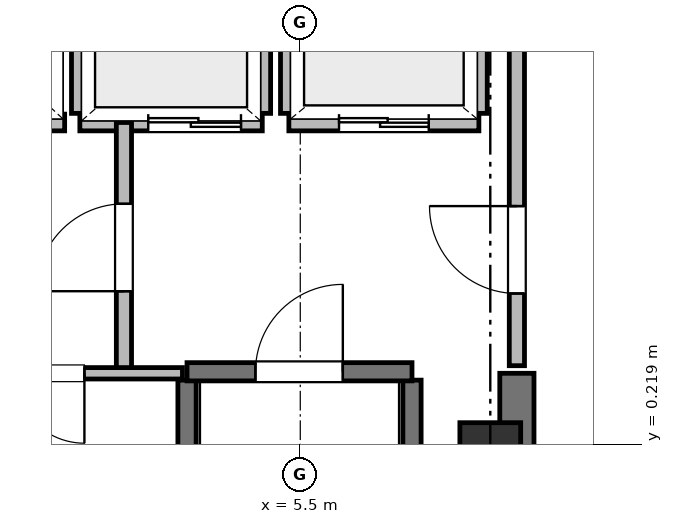
"""IFC4 building model, lengths in metres.
Left out: names, types, materials, properties, quantities, classifications, styles, units other than length and angle.
Written with IfcOpenShell. Run it as: python <this file> out.ifc"""

import sys

from ifc_helpers import new_model, si_unit, direction, frame, frame_2d, origin, origin_2d, place, context, subcontext, project, spatial, rectangle, extrude, element, fill, save


model = new_model("IFC4")
c1 = context("Model", 3, precision=1e-05, world=origin(), true_north=direction((0.0, 1.0)))
c2 = subcontext(c1, "Body", "Model", "MODEL_VIEW")
j1 = project(units=[si_unit("LENGTHUNIT", "METRE"), si_unit("PLANEANGLEUNIT", "RADIAN")], contexts=[c1])
p1 = place(None, origin())
s1 = spatial("IfcSite", under=j1, at=p1, CompositionType="ELEMENT")
p2 = place(p1, origin())
s2 = spatial("IfcBuilding", under=s1, at=p2, CompositionType="ELEMENT")
p3 = place(p2, frame((0.0, 0.0, 281.6)))
s3 = spatial("IfcBuildingStorey", under=s2, at=p3, CompositionType="ELEMENT", Elevation=281.6)
p4 = place(p3, frame((8.0, 0.0, 0.0), z_axis=(0.0, 0.0, 1.0), x_axis=(1.0, 0.0, 0.0)))
e1 = element("IfcColumn", 1, at=p4, inside=s3, PredefinedType="COLUMN", context=c2, shape_type="SweptSolid", body=[
    extrude(rectangle(XDim=0.8, YDim=1.0, at=origin_2d()), origin(), (0.0, 0.0, 1.0), 4.4),
])
p5 = place(p3, frame((8.35, -6.95, 0.0), z_axis=(0.0, 0.0, 1.0), x_axis=(0.0, 1.0, 0.0)))
e2 = element("IfcWall", 2, at=p5, inside=s3, PredefinedType="SHEAR", context=c2, shape_type="SweptSolid", body=[
    extrude(rectangle(XDim=8.1, YDim=0.45, at=frame_2d((4.05, 0.0))), origin(), (0.0, 0.0, 1.0), 4.13),
])
for number, where, z_axis, x_axis in (
    (3, (4.01, -6.16, 0.0), (0.0, 0.0, 1.0), (0.0, 1.0, 0.0)),
    (4, (6.97, -6.16, 0.0), (0.0, 0.0, 1.0), (0.0, 1.0, 0.0)),
):
    element("IfcWall", number, at=place(p3, frame(where, z_axis=z_axis, x_axis=x_axis)), inside=s3, PredefinedType="SHEAR", context=c2, shape_type="SweptSolid", body=[
        extrude(rectangle(XDim=7.22, YDim=0.24, at=frame_2d((3.61, 0.0))), origin(), (0.0, 0.0, 1.0), 4.13),
    ])
p6 = place(p3, frame((4.01, 1.17, 0.0), z_axis=(0.0, 0.0, 1.0), x_axis=(1.0, 0.0, 0.0)))
e5 = element("IfcWall", 5, at=p6, inside=s3, PredefinedType="SHEAR", context=c2, shape_type="SweptSolid", body=[
    extrude(rectangle(XDim=2.96, YDim=0.24, at=frame_2d((1.48, 0.0))), origin(), (0.0, 0.0, 1.0), 4.13),
])
p7 = place(p6, frame((0.9, 0.0, 0.0)))
e6 = element("IfcOpeningElement", 6, at=p7, cuts=e5, PredefinedType="OPENING", context=c2, shape_type="SweptSolid", body=[
    extrude(rectangle(XDim=1.15, YDim=2.15, at=frame_2d((0.575, 1.075))), frame((0.0, 0.13, 0.0), z_axis=(0.0, -1.0, 0.0), x_axis=(1.0, 0.0, 0.0)), (0.0, 0.0, 1.0), 0.26),
])
p8 = place(p3, frame((5.35, 4.45, 0.0), z_axis=(0.0, 0.0, 1.0), x_axis=(1.0, 0.0, 0.0)))
e7 = element("IfcWall", 7, at=p8, inside=s3, PredefinedType="PARTITIONING", context=c2, shape_type="SweptSolid", body=[
    extrude(rectangle(XDim=2.5, YDim=0.22, at=frame_2d((1.25, 0.0))), origin(), (0.0, 0.0, 1.0), 4.13),
])
p9 = place(p8, frame((0.66, 0.0, 0.0)))
e8 = element("IfcOpeningElement", 8, at=p9, cuts=e7, PredefinedType="OPENING", context=c2, shape_type="SweptSolid", body=[
    extrude(rectangle(XDim=1.18, YDim=2.15, at=frame_2d((0.59, 1.075))), frame((0.0, 0.12, 0.0), z_axis=(0.0, -1.0, 0.0), x_axis=(1.0, 0.0, 0.0)), (0.0, 0.0, 1.0), 0.24),
])
p10 = place(p3, frame((5.35, 4.57, 0.0), z_axis=(0.0, 0.0, 1.0), x_axis=(0.0, 1.0, 0.0)))
e9 = element("IfcWall", 9, at=p10, inside=s3, PredefinedType="PARTITIONING", context=c2, shape_type="SweptSolid", body=[
    extrude(rectangle(XDim=2.155, YDim=0.22, at=frame_2d((1.078, 0.0))), origin(), (0.0, 0.0, 1.0), 4.13),
])
p11 = place(p3, frame((7.85, 4.57, 0.0), z_axis=(0.0, 0.0, 1.0), x_axis=(0.0, 1.0, 0.0)))
e10 = element("IfcWall", 10, at=p11, inside=s3, PredefinedType="PARTITIONING", context=c2, shape_type="SweptSolid", body=[
    extrude(rectangle(XDim=2.155, YDim=0.22, at=frame_2d((1.078, 0.0))), origin(), (0.0, 0.0, 1.0), 3.81),
])
p12 = place(p3, frame((2.6, 4.45, 0.0), z_axis=(0.0, 0.0, 1.0), x_axis=(1.0, 0.0, 0.0)))
e11 = element("IfcWall", 11, at=p12, inside=s3, PredefinedType="PARTITIONING", context=c2, shape_type="SweptSolid", body=[
    extrude(rectangle(XDim=2.4, YDim=0.22, at=frame_2d((1.2, 0.0))), origin(), (0.0, 0.0, 1.0), 4.13),
])
p13 = place(p12, frame((0.9, 0.0, 0.0)))
e12 = element("IfcOpeningElement", 12, at=p13, cuts=e11, PredefinedType="OPENING", context=c2, shape_type="SweptSolid", body=[
    extrude(rectangle(XDim=1.22, YDim=2.15, at=frame_2d((0.61, 1.075))), frame((0.0, 0.12, 0.0), z_axis=(0.0, -1.0, 0.0), x_axis=(1.0, 0.0, 0.0)), (0.0, 0.0, 1.0), 0.24),
])
for number, where, z_axis, x_axis in (
    (13, (2.6, 4.57, 0.0), (0.0, 0.0, 1.0), (0.0, 1.0, 0.0)),
    (14, (5.0, 4.57, 0.0), (0.0, 0.0, 1.0), (0.0, 1.0, 0.0)),
):
    element("IfcWall", number, at=place(p3, frame(where, z_axis=z_axis, x_axis=x_axis)), inside=s3, PredefinedType="PARTITIONING", context=c2, shape_type="SweptSolid", body=[
        extrude(rectangle(XDim=2.155, YDim=0.22, at=frame_2d((1.078, 0.0))), origin(), (0.0, 0.0, 1.0), 4.13),
    ])
p14 = place(p3, frame((0.2, 4.45, 0.0), z_axis=(0.0, 0.0, 1.0), x_axis=(1.0, 0.0, 0.0)))
e15 = element("IfcWall", 15, at=p14, inside=s3, PredefinedType="PARTITIONING", context=c2, shape_type="SweptSolid", body=[
    extrude(rectangle(XDim=2.2, YDim=0.22, at=frame_2d((1.1, 0.0))), origin(), (0.0, 0.0, 1.0), 4.13),
])
p15 = place(p14, frame((0.53, 0.0, 0.0)))
e16 = element("IfcOpeningElement", 16, at=p15, cuts=e15, PredefinedType="OPENING", context=c2, shape_type="SweptSolid", body=[
    extrude(rectangle(XDim=1.14, YDim=2.15, at=frame_2d((0.57, 1.075))), frame((0.0, 0.12, 0.0), z_axis=(0.0, -1.0, 0.0), x_axis=(1.0, 0.0, 0.0)), (0.0, 0.0, 1.0), 0.24),
])
p16 = place(p3, frame((3.18, 1.15, 0.0), z_axis=(0.0, 0.0, 1.0), x_axis=(0.0, 1.0, 0.0)))
e17 = element("IfcWall", 17, at=p16, inside=s3, PredefinedType="PARTITIONING", context=c2, shape_type="SweptSolid", body=[
    extrude(rectangle(XDim=3.3, YDim=0.2, at=frame_2d((1.65, 0.0))), origin(), (0.0, 0.0, 1.0), 4.13),
])
p17 = place(p16, frame((1.08, 0.0, 0.0)))
e18 = element("IfcOpeningElement", 18, at=p17, cuts=e17, PredefinedType="OPENING", context=c2, shape_type="SweptSolid", body=[
    extrude(rectangle(XDim=1.15, YDim=2.15, at=frame_2d((0.575, 1.075))), frame((0.0, 0.11, 0.0), z_axis=(0.0, -1.0, 0.0), x_axis=(1.0, 0.0, 0.0)), (0.0, 0.0, 1.0), 0.22),
])
p18 = place(p3, frame((8.35, 1.25, 0.0), z_axis=(0.0, 0.0, 1.0), x_axis=(0.0, 1.0, 0.0)))
e19 = element("IfcWall", 19, at=p18, inside=s3, PredefinedType="PARTITIONING", context=c2, shape_type="SweptSolid", body=[
    extrude(rectangle(XDim=5.3, YDim=0.2, at=frame_2d((2.65, 0.0))), origin(), (0.0, 0.0, 1.0), 4.13),
])
p19 = place(p18, frame((0.95, 0.0, 0.0)))
e20 = element("IfcOpeningElement", 20, at=p19, cuts=e19, PredefinedType="OPENING", context=c2, shape_type="SweptSolid", body=[
    extrude(rectangle(XDim=1.15, YDim=2.15, at=frame_2d((0.575, 1.075))), frame((0.0, 0.11, 0.0), z_axis=(0.0, -1.0, 0.0), x_axis=(1.0, 0.0, 0.0)), (0.0, 0.0, 1.0), 0.22),
])
p20 = place(p3, frame((3.95, 1.15, 0.0), z_axis=(0.0, 0.0, 1.0), x_axis=(-1.0, 0.0, 0.0)))
e21 = element("IfcWall", 21, at=p20, inside=s3, PredefinedType="PARTITIONING", context=c2, shape_type="SweptSolid", body=[
    extrude(rectangle(XDim=7.9, YDim=0.15, at=frame_2d((3.95, 0.0))), origin(), (0.0, 0.0, 1.0), 4.13),
])
p21 = place(p20, frame((5.74, 0.0, 0.0)))
e22 = element("IfcOpeningElement", 22, at=p21, cuts=e21, PredefinedType="OPENING", context=c2, shape_type="SweptSolid", body=[
    extrude(rectangle(XDim=0.92, YDim=2.05, at=frame_2d((0.46, 1.025))), frame((0.0, 0.085, 0.0), z_axis=(0.0, -1.0, 0.0), x_axis=(1.0, 0.0, 0.0)), (0.0, 0.0, 1.0), 0.17),
])
p22 = place(p20, frame((3.54, 0.0, 0.0)))
e23 = element("IfcOpeningElement", 23, at=p22, cuts=e21, PredefinedType="OPENING", context=c2, shape_type="SweptSolid", body=[
    extrude(rectangle(XDim=0.92, YDim=2.05, at=frame_2d((0.46, 1.025))), frame((0.0, 0.085, 0.0), z_axis=(0.0, -1.0, 0.0), x_axis=(1.0, 0.0, 0.0)), (0.0, 0.0, 1.0), 0.17),
])
p23 = place(p20, frame((1.29, 0.0, 0.0)))
e24 = element("IfcOpeningElement", 24, at=p23, cuts=e21, PredefinedType="OPENING", context=c2, shape_type="SweptSolid", body=[
    extrude(rectangle(XDim=0.92, YDim=2.05, at=frame_2d((0.46, 1.025))), frame((0.0, 0.085, 0.0), z_axis=(0.0, -1.0, 0.0), x_axis=(1.0, 0.0, 0.0)), (0.0, 0.0, 1.0), 0.17),
])
p24 = place(p7, origin())
e25 = element("IfcDoor", 25, at=p24, inside=s3, OperationType="SINGLE_SWING_RIGHT", PredefinedType="DOOR", context=c2, shape_type="SweptSolid", body=[
    extrude(rectangle(XDim=1.15, YDim=2.15, at=frame_2d((0.575, 1.075))), frame((0.0, 0.025, 0.0), z_axis=(0.0, -1.0, 0.0), x_axis=(1.0, 0.0, 0.0)), (0.0, 0.0, 1.0), 0.05),
])
fill(e6, e25)
p25 = place(p9, origin())
e26 = element("IfcDoor", 26, at=p25, inside=s3, OperationType="DOUBLE_DOOR_SLIDING", PredefinedType="DOOR", context=c2, shape_type="SweptSolid", body=[
    extrude(rectangle(XDim=1.18, YDim=2.15, at=frame_2d((0.59, 1.075))), frame((0.0, 0.025, 0.0), z_axis=(0.0, -1.0, 0.0), x_axis=(1.0, 0.0, 0.0)), (0.0, 0.0, 1.0), 0.05),
])
fill(e8, e26)
p26 = place(p13, origin())
e27 = element("IfcDoor", 27, at=p26, inside=s3, OperationType="DOUBLE_DOOR_SLIDING", PredefinedType="DOOR", context=c2, shape_type="SweptSolid", body=[
    extrude(rectangle(XDim=1.22, YDim=2.15, at=frame_2d((0.61, 1.075))), frame((0.0, 0.025, 0.0), z_axis=(0.0, -1.0, 0.0), x_axis=(1.0, 0.0, 0.0)), (0.0, 0.0, 1.0), 0.05),
])
fill(e12, e27)
p27 = place(p17, origin())
e28 = element("IfcDoor", 28, at=p27, inside=s3, OperationType="SINGLE_SWING_LEFT", PredefinedType="DOOR", context=c2, shape_type="SweptSolid", body=[
    extrude(rectangle(XDim=1.15, YDim=2.15, at=frame_2d((0.575, 1.075))), frame((0.0, 0.025, 0.0), z_axis=(0.0, -1.0, 0.0), x_axis=(1.0, 0.0, 0.0)), (0.0, 0.0, 1.0), 0.05),
])
fill(e18, e28)
p28 = place(p19, origin())
e29 = element("IfcDoor", 29, at=p28, inside=s3, OperationType="SINGLE_SWING_RIGHT", PredefinedType="DOOR", context=c2, shape_type="SweptSolid", body=[
    extrude(rectangle(XDim=1.15, YDim=2.15, at=frame_2d((0.575, 1.075))), frame((0.0, 0.025, 0.0), z_axis=(0.0, -1.0, 0.0), x_axis=(1.0, 0.0, 0.0)), (0.0, 0.0, 1.0), 0.05),
])
fill(e20, e29)
p29 = place(p23, origin())
e30 = element("IfcDoor", 30, at=p29, inside=s3, OperationType="SINGLE_SWING_LEFT", PredefinedType="DOOR", context=c2, shape_type="SweptSolid", body=[
    extrude(rectangle(XDim=0.92, YDim=2.05, at=frame_2d((0.46, 1.025))), frame((0.0, 0.025, 0.0), z_axis=(0.0, -1.0, 0.0), x_axis=(1.0, 0.0, 0.0)), (0.0, 0.0, 1.0), 0.05),
])
fill(e24, e30)
save(model, sys.argv[1])
